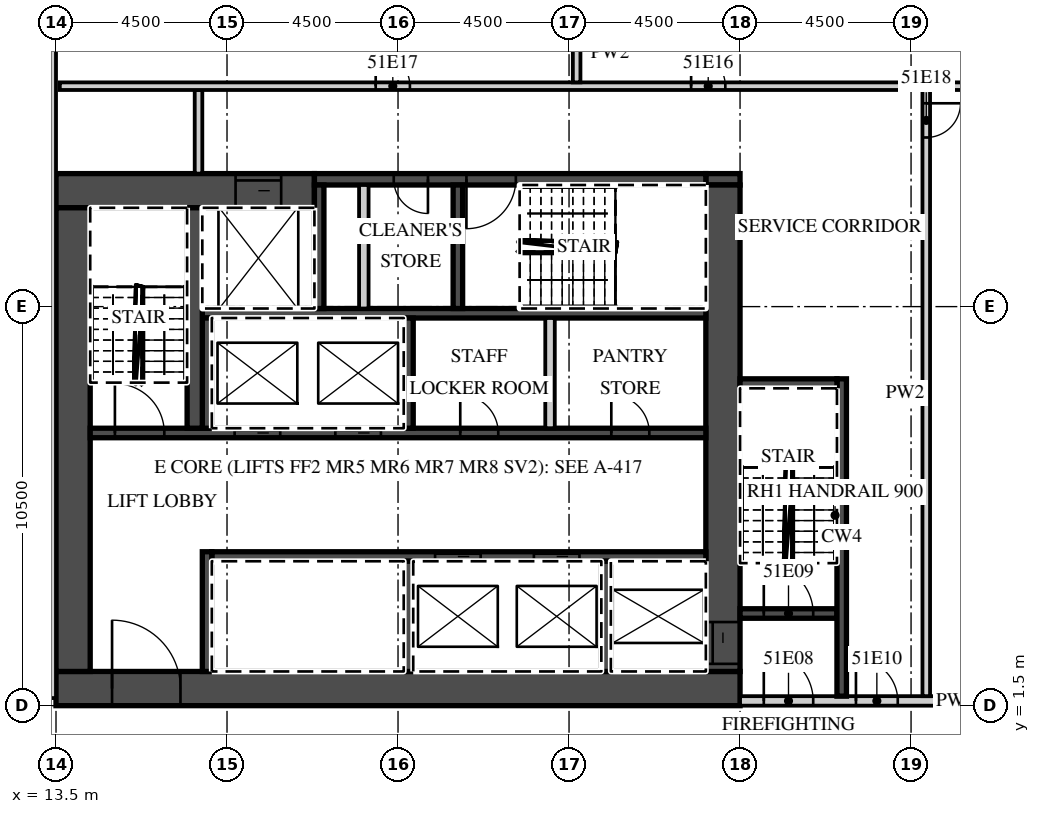
"""IFC4 building model, lengths in metres.
Left out: names, types, materials, properties, quantities, classifications, styles, units other than length and angle.
Written with IfcOpenShell. Run it as: python <this file> out.ifc"""

import sys

from ifc_helpers import new_model, si_unit, direction, frame, frame_2d, origin, place, context, subcontext, project, spatial, rectangle, extrude, element, fill, save


model = new_model("IFC4")
c1 = context("Model", 3, precision=1e-05, world=origin(), true_north=direction((0.0, 1.0)))
c2 = subcontext(c1, "Body", "Model", "MODEL_VIEW")
j1 = project(units=[si_unit("LENGTHUNIT", "METRE"), si_unit("PLANEANGLEUNIT", "RADIAN")], contexts=[c1])
p1 = place(None, origin())
s1 = spatial("IfcSite", under=j1, at=p1, CompositionType="ELEMENT")
p2 = place(p1, origin())
s2 = spatial("IfcBuilding", under=s1, at=p2, CompositionType="ELEMENT")
p3 = place(p2, frame((0.0, 0.0, 211.1)))
s3 = spatial("IfcBuildingStorey", under=s2, at=p3, CompositionType="ELEMENT", Elevation=211.1)
p4 = place(p3, frame((13.5, 1.95, 0.0), z_axis=(0.0, 0.0, 1.0), x_axis=(1.0, 0.0, 0.0)))
e1 = element("IfcWall", 1, at=p4, inside=s3, PredefinedType="SHEAR", context=c2, shape_type="SweptSolid", body=[
    extrude(rectangle(XDim=18.0, YDim=0.9, at=frame_2d((9.0, 0.0))), origin(), (0.0, 0.0, 1.0), 6.32),
])
p5 = place(p4, frame((1.475, 0.0, 0.0)))
e2 = element("IfcOpeningElement", 2, at=p5, cuts=e1, PredefinedType="OPENING", context=c2, shape_type="SweptSolid", body=[
    extrude(rectangle(XDim=1.8, YDim=2.1, at=frame_2d((0.9, 1.05))), frame((0.0, 0.46, 0.0), z_axis=(0.0, -1.0, 0.0), x_axis=(1.0, 0.0, 0.0)), (0.0, 0.0, 1.0), 0.92),
])
p6 = place(p3, frame((13.5, 15.05, 0.0), z_axis=(0.0, 0.0, 1.0), x_axis=(1.0, 0.0, 0.0)))
e3 = element("IfcWall", 3, at=p6, inside=s3, PredefinedType="SHEAR", context=c2, shape_type="SweptSolid", body=[
    extrude(rectangle(XDim=6.8, YDim=0.9, at=frame_2d((3.4, 0.0))), origin(), (0.0, 0.0, 1.0), 6.32),
])
p7 = place(p6, frame((4.725, 0.0, 0.0)))
e4 = element("IfcOpeningElement", 4, at=p7, cuts=e3, PredefinedType="OPENING", context=c2, shape_type="SweptSolid", body=[
    extrude(rectangle(XDim=1.2, YDim=2.1, at=frame_2d((0.6, 1.05))), frame((0.0, 0.46, 0.0), z_axis=(0.0, -1.0, 0.0), x_axis=(1.0, 0.0, 0.0)), (0.0, 0.0, 1.0), 0.92),
])
p8 = place(p3, frame((30.6, 15.35, 0.0), z_axis=(0.0, 0.0, 1.0), x_axis=(1.0, 0.0, 0.0)))
e5 = element("IfcWall", 5, at=p8, inside=s3, PredefinedType="SHEAR", context=c2, shape_type="SweptSolid", body=[
    extrude(rectangle(XDim=0.9, YDim=0.3, at=frame_2d((0.45, 0.0))), origin(), (0.0, 0.0, 1.0), 6.32),
])
p9 = place(p3, frame((20.3, 15.35, 0.0), z_axis=(0.0, 0.0, 1.0), x_axis=(1.0, 0.0, 0.0)))
e6 = element("IfcWall", 6, at=p9, inside=s3, PredefinedType="SHEAR", context=c2, shape_type="SweptSolid", body=[
    extrude(rectangle(XDim=10.3, YDim=0.3, at=frame_2d((5.15, 0.0))), origin(), (0.0, 0.0, 1.0), 6.32),
])
p10 = place(p9, frame((4.0, 0.0, 0.0)))
e7 = element("IfcOpeningElement", 7, at=p10, cuts=e6, PredefinedType="OPENING", context=c2, shape_type="SweptSolid", body=[
    extrude(rectangle(XDim=1.3, YDim=2.1, at=frame_2d((0.65, 1.05))), frame((0.0, 0.16, 0.0), z_axis=(0.0, -1.0, 0.0), x_axis=(1.0, 0.0, 0.0)), (0.0, 0.0, 1.0), 0.32),
])
p11 = place(p9, frame((2.087, 0.0, 0.0)))
e8 = element("IfcOpeningElement", 8, at=p11, cuts=e6, PredefinedType="OPENING", context=c2, shape_type="SweptSolid", body=[
    extrude(rectangle(XDim=0.9, YDim=2.1, at=frame_2d((0.45, 1.05))), frame((0.0, 0.16, 0.0), z_axis=(0.0, -1.0, 0.0), x_axis=(1.0, 0.0, 0.0)), (0.0, 0.0, 1.0), 0.32),
])
p12 = place(p3, frame((31.05, 2.4, 0.0), z_axis=(0.0, 0.0, 1.0), x_axis=(0.0, 1.0, 0.0)))
e9 = element("IfcWall", 9, at=p12, inside=s3, PredefinedType="SHEAR", context=c2, shape_type="SweptSolid", body=[
    extrude(rectangle(XDim=12.8, YDim=0.9, at=frame_2d((6.4, 0.0))), origin(), (0.0, 0.0, 1.0), 6.32),
])
p13 = place(p12, frame((0.2, 0.0, 0.0)))
e10 = element("IfcOpeningElement", 10, at=p13, cuts=e9, PredefinedType="OPENING", context=c2, shape_type="SweptSolid", body=[
    extrude(rectangle(XDim=1.1, YDim=2.1, at=frame_2d((0.55, 1.05))), frame((0.0, 0.46, 0.0), z_axis=(0.0, -1.0, 0.0), x_axis=(1.0, 0.0, 0.0)), (0.0, 0.0, 1.0), 0.92),
])
p14 = place(p3, frame((13.95, 2.4, 0.0), z_axis=(0.0, 0.0, 1.0), x_axis=(0.0, 1.0, 0.0)))
e11 = element("IfcWall", 11, at=p14, inside=s3, PredefinedType="SHEAR", context=c2, shape_type="SweptSolid", body=[
    extrude(rectangle(XDim=12.2, YDim=0.9, at=frame_2d((6.1, 0.0))), origin(), (0.0, 0.0, 1.0), 6.32),
])
p15 = place(p3, frame((17.6, 5.425, 0.0), z_axis=(0.0, 0.0, 1.0), x_axis=(1.0, 0.0, 0.0)))
e12 = element("IfcWall", 12, at=p15, inside=s3, PredefinedType="SHEAR", context=c2, shape_type="SweptSolid", body=[
    extrude(rectangle(XDim=13.0, YDim=0.25, at=frame_2d((6.5, 0.0))), origin(), (0.0, 0.0, 1.0), 6.32),
])
p16 = place(p15, frame((8.475, 0.0, 0.0)))
e13 = element("IfcOpeningElement", 13, at=p16, cuts=e12, PredefinedType="OPENING", context=c2, shape_type="SweptSolid", body=[
    extrude(rectangle(XDim=1.2, YDim=2.1, at=frame_2d((0.6, 1.05))), frame((0.0, 0.135, 0.0), z_axis=(0.0, -1.0, 0.0), x_axis=(1.0, 0.0, 0.0)), (0.0, 0.0, 1.0), 0.27),
])
p17 = place(p15, frame((5.875, 0.0, 0.0)))
e14 = element("IfcOpeningElement", 14, at=p17, cuts=e12, PredefinedType="OPENING", context=c2, shape_type="SweptSolid", body=[
    extrude(rectangle(XDim=1.2, YDim=2.1, at=frame_2d((0.6, 1.05))), frame((0.0, 0.135, 0.0), z_axis=(0.0, -1.0, 0.0), x_axis=(1.0, 0.0, 0.0)), (0.0, 0.0, 1.0), 0.27),
])
p18 = place(p3, frame((17.475, 2.4, 0.0), z_axis=(0.0, 0.0, 1.0), x_axis=(0.0, 1.0, 0.0)))
e15 = element("IfcWall", 15, at=p18, inside=s3, PredefinedType="SHEAR", context=c2, shape_type="SweptSolid", body=[
    extrude(rectangle(XDim=3.15, YDim=0.25, at=frame_2d((1.575, 0.0))), origin(), (0.0, 0.0, 1.0), 6.32),
])
for number, where, z_axis, x_axis in (
    (16, (27.975, 2.4, 0.0), (0.0, 0.0, 1.0), (0.0, 1.0, 0.0)),
    (17, (22.775, 2.4, 0.0), (0.0, 0.0, 1.0), (0.0, 1.0, 0.0)),
):
    element("IfcWall", number, at=place(p3, frame(where, z_axis=z_axis, x_axis=x_axis)), inside=s3, PredefinedType="SHEAR", context=c2, shape_type="SweptSolid", body=[
        extrude(rectangle(XDim=2.9, YDim=0.25, at=frame_2d((1.45, 0.0))), origin(), (0.0, 0.0, 1.0), 6.32),
    ])
p19 = place(p3, frame((14.4, 8.675, 0.0), z_axis=(0.0, 0.0, 1.0), x_axis=(1.0, 0.0, 0.0)))
e18 = element("IfcWall", 18, at=p19, inside=s3, PredefinedType="SHEAR", context=c2, shape_type="SweptSolid", body=[
    extrude(rectangle(XDim=16.2, YDim=0.25, at=frame_2d((8.1, 0.0))), origin(), (0.0, 0.0, 1.0), 6.32),
])
p20 = place(p19, frame((6.45, 0.0, 0.0)))
e19 = element("IfcOpeningElement", 19, at=p20, cuts=e18, PredefinedType="OPENING", context=c2, shape_type="SweptSolid", body=[
    extrude(rectangle(XDim=1.2, YDim=2.1, at=frame_2d((0.6, 1.05))), frame((0.0, 0.135, 0.0), z_axis=(0.0, -1.0, 0.0), x_axis=(1.0, 0.0, 0.0)), (0.0, 0.0, 1.0), 0.27),
])
p21 = place(p19, frame((3.8, 0.0, 0.0)))
e20 = element("IfcOpeningElement", 20, at=p21, cuts=e18, PredefinedType="OPENING", context=c2, shape_type="SweptSolid", body=[
    extrude(rectangle(XDim=1.2, YDim=2.1, at=frame_2d((0.6, 1.05))), frame((0.0, 0.135, 0.0), z_axis=(0.0, -1.0, 0.0), x_axis=(1.0, 0.0, 0.0)), (0.0, 0.0, 1.0), 0.27),
])
p22 = place(p19, frame((0.65, 0.0, 0.0)))
e21 = element("IfcOpeningElement", 21, at=p22, cuts=e18, PredefinedType="OPENING", context=c2, shape_type="SweptSolid", body=[
    extrude(rectangle(XDim=1.3, YDim=2.1, at=frame_2d((0.65, 1.05))), frame((0.0, 0.135, 0.0), z_axis=(0.0, -1.0, 0.0), x_axis=(1.0, 0.0, 0.0)), (0.0, 0.0, 1.0), 0.27),
])
p23 = place(p19, frame((13.712, 0.0, 0.0)))
e22 = element("IfcOpeningElement", 22, at=p23, cuts=e18, PredefinedType="OPENING", context=c2, shape_type="SweptSolid", body=[
    extrude(rectangle(XDim=1.0, YDim=2.1, at=frame_2d((0.5, 1.05))), frame((0.0, 0.135, 0.0), z_axis=(0.0, -1.0, 0.0), x_axis=(1.0, 0.0, 0.0)), (0.0, 0.0, 1.0), 0.27),
])
p24 = place(p19, frame((9.738, 0.0, 0.0)))
e23 = element("IfcOpeningElement", 23, at=p24, cuts=e18, PredefinedType="OPENING", context=c2, shape_type="SweptSolid", body=[
    extrude(rectangle(XDim=1.0, YDim=2.1, at=frame_2d((0.5, 1.05))), frame((0.0, 0.135, 0.0), z_axis=(0.0, -1.0, 0.0), x_axis=(1.0, 0.0, 0.0)), (0.0, 0.0, 1.0), 0.27),
])
p25 = place(p3, frame((17.35, 11.825, 0.0), z_axis=(0.0, 0.0, 1.0), x_axis=(1.0, 0.0, 0.0)))
e24 = element("IfcWall", 24, at=p25, inside=s3, PredefinedType="SHEAR", context=c2, shape_type="SweptSolid", body=[
    extrude(rectangle(XDim=13.25, YDim=0.25, at=frame_2d((6.625, 0.0))), origin(), (0.0, 0.0, 1.0), 6.32),
])
for number, where, z_axis, x_axis in (
    (25, (17.475, 8.8, 0.0), (0.0, 0.0, 1.0), (0.0, 1.0, 0.0)),
    (26, (22.775, 8.8, 0.0), (0.0, 0.0, 1.0), (0.0, 1.0, 0.0)),
):
    element("IfcWall", number, at=place(p3, frame(where, z_axis=z_axis, x_axis=x_axis)), inside=s3, PredefinedType="SHEAR", context=c2, shape_type="SweptSolid", body=[
        extrude(rectangle(XDim=2.9, YDim=0.25, at=frame_2d((1.45, 0.0))), origin(), (0.0, 0.0, 1.0), 6.32),
    ])
p26 = place(p3, frame((26.5, 8.8, 0.0), z_axis=(0.0, 0.0, 1.0), x_axis=(0.0, 1.0, 0.0)))
e27 = element("IfcWall", 27, at=p26, inside=s3, PredefinedType="PARTITIONING", context=c2, shape_type="SweptSolid", body=[
    extrude(rectangle(XDim=2.9, YDim=0.25, at=frame_2d((1.45, 0.0))), origin(), (0.0, 0.0, 1.0), 6.32),
])
p27 = place(p3, frame((17.15, 8.8, 0.0), z_axis=(0.0, 0.0, 1.0), x_axis=(0.0, 1.0, 0.0)))
e28 = element("IfcWall", 28, at=p27, inside=s3, PredefinedType="SHEAR", context=c2, shape_type="SweptSolid", body=[
    extrude(rectangle(XDim=5.8, YDim=0.4, at=frame_2d((2.9, 0.0))), origin(), (0.0, 0.0, 1.0), 6.32),
])
for number, where, z_axis, x_axis in (
    (29, (20.425, 11.95, 0.0), (0.0, 0.0, 1.0), (0.0, 1.0, 0.0)),
    (30, (24.075, 11.95, 0.0), (0.0, 0.0, 1.0), (0.0, 1.0, 0.0)),
):
    element("IfcWall", number, at=place(p3, frame(where, z_axis=z_axis, x_axis=x_axis)), inside=s3, PredefinedType="SHEAR", context=c2, shape_type="SweptSolid", body=[
        extrude(rectangle(XDim=3.25, YDim=0.25, at=frame_2d((1.625, 0.0))), origin(), (0.0, 0.0, 1.0), 6.32),
    ])
p28 = place(p3, frame((21.6, 11.95, 0.0), z_axis=(0.0, 0.0, 1.0), x_axis=(0.0, 1.0, 0.0)))
e31 = element("IfcWall", 31, at=p28, inside=s3, PredefinedType="PARTITIONING", context=c2, shape_type="SweptSolid", body=[
    extrude(rectangle(XDim=3.25, YDim=0.25, at=frame_2d((1.625, 0.0))), origin(), (0.0, 0.0, 1.0), 6.32),
])
p29 = place(p3, frame((31.5, 1.625, 0.0), z_axis=(0.0, 0.0, 1.0), x_axis=(1.0, 0.0, 0.0)))
e32 = element("IfcWall", 32, at=p29, inside=s3, PredefinedType="PARTITIONING", context=c2, shape_type="SweptSolid", body=[
    extrude(rectangle(XDim=11.34, YDim=0.25, at=frame_2d((5.67, 0.0))), origin(), (0.0, 0.0, 1.0), 6.32),
])
p30 = place(p29, frame((0.625, 0.0, 0.0)))
e33 = element("IfcOpeningElement", 33, at=p30, cuts=e32, PredefinedType="OPENING", context=c2, shape_type="SweptSolid", body=[
    extrude(rectangle(XDim=1.3, YDim=2.1, at=frame_2d((0.65, 1.05))), frame((0.0, 0.135, 0.0), z_axis=(0.0, -1.0, 0.0), x_axis=(1.0, 0.0, 0.0)), (0.0, 0.0, 1.0), 0.27),
])
p31 = place(p29, frame((3.05, 0.0, 0.0)))
e34 = element("IfcOpeningElement", 34, at=p31, cuts=e32, PredefinedType="OPENING", context=c2, shape_type="SweptSolid", body=[
    extrude(rectangle(XDim=1.1, YDim=2.1, at=frame_2d((0.55, 1.05))), frame((0.0, 0.135, 0.0), z_axis=(0.0, -1.0, 0.0), x_axis=(1.0, 0.0, 0.0)), (0.0, 0.0, 1.0), 0.27),
])
p32 = place(p3, frame((31.5, 3.925, 0.0), z_axis=(0.0, 0.0, 1.0), x_axis=(1.0, 0.0, 0.0)))
e35 = element("IfcWall", 35, at=p32, inside=s3, PredefinedType="SHEAR", context=c2, shape_type="SweptSolid", body=[
    extrude(rectangle(XDim=2.55, YDim=0.25, at=frame_2d((1.275, 0.0))), origin(), (0.0, 0.0, 1.0), 6.32),
])
p33 = place(p32, frame((0.625, 0.0, 0.0)))
e36 = element("IfcOpeningElement", 36, at=p33, cuts=e35, PredefinedType="OPENING", context=c2, shape_type="SweptSolid", body=[
    extrude(rectangle(XDim=1.3, YDim=2.1, at=frame_2d((0.65, 1.05))), frame((0.0, 0.135, 0.0), z_axis=(0.0, -1.0, 0.0), x_axis=(1.0, 0.0, 0.0)), (0.0, 0.0, 1.0), 0.27),
])
p34 = place(p3, frame((34.175, 1.75, 0.0), z_axis=(0.0, 0.0, 1.0), x_axis=(0.0, 1.0, 0.0)))
e37 = element("IfcWall", 37, at=p34, inside=s3, PredefinedType="SHEAR", context=c2, shape_type="SweptSolid", body=[
    extrude(rectangle(XDim=8.35, YDim=0.25, at=frame_2d((4.175, 0.0))), origin(), (0.0, 0.0, 1.0), 6.32),
])
p35 = place(p3, frame((31.5, 9.975, 0.0), z_axis=(0.0, 0.0, 1.0), x_axis=(1.0, 0.0, 0.0)))
e38 = element("IfcWall", 38, at=p35, inside=s3, PredefinedType="SHEAR", context=c2, shape_type="SweptSolid", body=[
    extrude(rectangle(XDim=2.55, YDim=0.25, at=frame_2d((1.275, 0.0))), origin(), (0.0, 0.0, 1.0), 6.32),
])
p36 = place(p3, frame((17.25, 15.5, 0.0), z_axis=(0.0, 0.0, 1.0), x_axis=(0.0, 1.0, 0.0)))
e39 = element("IfcWall", 39, at=p36, inside=s3, PredefinedType="PARTITIONING", context=c2, shape_type="SweptSolid", body=[
    extrude(rectangle(XDim=2.2, YDim=0.2, at=frame_2d((1.1, 0.0))), origin(), (0.0, 0.0, 1.0), 6.32),
])
p37 = place(p3, frame((36.4, 1.75, 0.0), z_axis=(0.0, 0.0, 1.0), x_axis=(0.0, 1.0, 0.0)))
e40 = element("IfcWall", 40, at=p37, inside=s3, PredefinedType="PARTITIONING", context=c2, shape_type="SweptSolid", body=[
    extrude(rectangle(XDim=15.95, YDim=0.2, at=frame_2d((7.975, 0.0))), origin(), (0.0, 0.0, 1.0), 6.32),
])
p38 = place(p37, frame((14.7, 0.0, 0.0)))
e41 = element("IfcOpeningElement", 41, at=p38, cuts=e40, PredefinedType="OPENING", context=c2, shape_type="SweptSolid", body=[
    extrude(rectangle(XDim=0.9, YDim=2.1, at=frame_2d((0.45, 1.05))), frame((0.0, 0.11, 0.0), z_axis=(0.0, -1.0, 0.0), x_axis=(1.0, 0.0, 0.0)), (0.0, 0.0, 1.0), 0.22),
])
p39 = place(p3, frame((13.6, 17.8, 0.0), z_axis=(0.0, 0.0, 1.0), x_axis=(1.0, 0.0, 0.0)))
e42 = element("IfcWall", 42, at=p39, inside=s3, PredefinedType="PARTITIONING", context=c2, shape_type="SweptSolid", body=[
    extrude(rectangle(XDim=28.958, YDim=0.2, at=frame_2d((14.479, 0.0))), origin(), (0.0, 0.0, 1.0), 6.32),
])
p40 = place(p39, frame((16.613, 0.0, 0.0)))
e43 = element("IfcOpeningElement", 43, at=p40, cuts=e42, PredefinedType="OPENING", context=c2, shape_type="SweptSolid", body=[
    extrude(rectangle(XDim=0.9, YDim=2.1, at=frame_2d((0.45, 1.05))), frame((0.0, 0.11, 0.0), z_axis=(0.0, -1.0, 0.0), x_axis=(1.0, 0.0, 0.0)), (0.0, 0.0, 1.0), 0.22),
])
p41 = place(p39, frame((8.312, 0.0, 0.0)))
e44 = element("IfcOpeningElement", 44, at=p41, cuts=e42, PredefinedType="OPENING", context=c2, shape_type="SweptSolid", body=[
    extrude(rectangle(XDim=0.9, YDim=2.1, at=frame_2d((0.45, 1.05))), frame((0.0, 0.11, 0.0), z_axis=(0.0, -1.0, 0.0), x_axis=(1.0, 0.0, 0.0)), (0.0, 0.0, 1.0), 0.22),
])
p42 = place(p3, frame((27.2, 17.9, 0.0), z_axis=(0.0, 0.0, 1.0), x_axis=(0.0, 1.0, 0.0)))
e45 = element("IfcWall", 45, at=p42, inside=s3, PredefinedType="PARTITIONING", context=c2, shape_type="SweptSolid", body=[
    extrude(rectangle(XDim=3.276, YDim=0.2, at=frame_2d((1.638, 0.0))), origin(), (0.0, 0.0, 1.0), 6.32),
])
p43 = place(p3, frame((13.4, 1.7, 0.0), z_axis=(0.0, 0.0, 1.0), x_axis=(0.0, 1.0, 0.0)))
e46 = element("IfcWall", 46, at=p43, inside=s3, PredefinedType="PARTITIONING", context=c2, shape_type="SweptSolid", body=[
    extrude(rectangle(XDim=19.535, YDim=0.2, at=frame_2d((9.767, 0.0))), origin(), (0.0, 0.0, 1.0), 6.32),
])
p44 = place(p20, origin())
e47 = element("IfcDoor", 47, at=p44, inside=s3, OperationType="SLIDING_TO_LEFT", PredefinedType="DOOR", context=c2, shape_type="SweptSolid", body=[
    extrude(rectangle(XDim=1.2, YDim=2.1, at=frame_2d((0.6, 1.05))), frame((0.0, 0.025, 0.0), z_axis=(0.0, -1.0, 0.0), x_axis=(1.0, 0.0, 0.0)), (0.0, 0.0, 1.0), 0.05),
])
fill(e19, e47)
p45 = place(p21, origin())
e48 = element("IfcDoor", 48, at=p45, inside=s3, OperationType="SLIDING_TO_RIGHT", PredefinedType="DOOR", context=c2, shape_type="SweptSolid", body=[
    extrude(rectangle(XDim=1.2, YDim=2.1, at=frame_2d((0.6, 1.05))), frame((0.0, 0.025, 0.0), z_axis=(0.0, -1.0, 0.0), x_axis=(1.0, 0.0, 0.0)), (0.0, 0.0, 1.0), 0.05),
])
fill(e20, e48)
p46 = place(p16, origin())
e49 = element("IfcDoor", 49, at=p46, inside=s3, OperationType="SLIDING_TO_LEFT", PredefinedType="DOOR", context=c2, shape_type="SweptSolid", body=[
    extrude(rectangle(XDim=1.2, YDim=2.1, at=frame_2d((0.6, 1.05))), frame((0.0, 0.025, 0.0), z_axis=(0.0, -1.0, 0.0), x_axis=(1.0, 0.0, 0.0)), (0.0, 0.0, 1.0), 0.05),
])
fill(e13, e49)
p47 = place(p17, origin())
e50 = element("IfcDoor", 50, at=p47, inside=s3, OperationType="SLIDING_TO_RIGHT", PredefinedType="DOOR", context=c2, shape_type="SweptSolid", body=[
    extrude(rectangle(XDim=1.2, YDim=2.1, at=frame_2d((0.6, 1.05))), frame((0.0, 0.025, 0.0), z_axis=(0.0, -1.0, 0.0), x_axis=(1.0, 0.0, 0.0)), (0.0, 0.0, 1.0), 0.05),
])
fill(e14, e50)
p48 = place(p7, origin())
e51 = element("IfcDoor", 51, at=p48, inside=s3, OperationType="SLIDING_TO_LEFT", PredefinedType="DOOR", context=c2, shape_type="SweptSolid", body=[
    extrude(rectangle(XDim=1.2, YDim=2.1, at=frame_2d((0.6, 1.05))), frame((0.0, 0.025, 0.0), z_axis=(0.0, -1.0, 0.0), x_axis=(1.0, 0.0, 0.0)), (0.0, 0.0, 1.0), 0.05),
])
fill(e4, e51)
p49 = place(p13, origin())
e52 = element("IfcDoor", 52, at=p49, inside=s3, OperationType="SLIDING_TO_LEFT", PredefinedType="DOOR", context=c2, shape_type="SweptSolid", body=[
    extrude(rectangle(XDim=1.1, YDim=2.1, at=frame_2d((0.55, 1.05))), frame((0.0, 0.025, 0.0), z_axis=(0.0, -1.0, 0.0), x_axis=(1.0, 0.0, 0.0)), (0.0, 0.0, 1.0), 0.05),
])
fill(e10, e52)
p50 = place(p5, origin())
e53 = element("IfcDoor", 53, at=p50, inside=s3, OperationType="DOUBLE_DOOR_DOUBLE_SWING", PredefinedType="DOOR", context=c2, shape_type="SweptSolid", body=[
    extrude(rectangle(XDim=1.8, YDim=2.1, at=frame_2d((0.9, 1.05))), frame((0.0, 0.025, 0.0), z_axis=(0.0, -1.0, 0.0), x_axis=(1.0, 0.0, 0.0)), (0.0, 0.0, 1.0), 0.05),
])
fill(e2, e53)
p51 = place(p30, origin())
e54 = element("IfcDoor", 54, at=p51, inside=s3, OperationType="SINGLE_SWING_LEFT", PredefinedType="DOOR", context=c2, shape_type="SweptSolid", body=[
    extrude(rectangle(XDim=1.3, YDim=2.1, at=frame_2d((0.65, 1.05))), frame((0.0, 0.025, 0.0), z_axis=(0.0, -1.0, 0.0), x_axis=(1.0, 0.0, 0.0)), (0.0, 0.0, 1.0), 0.05),
])
fill(e33, e54)
p52 = place(p33, origin())
e55 = element("IfcDoor", 55, at=p52, inside=s3, OperationType="SINGLE_SWING_LEFT", PredefinedType="DOOR", context=c2, shape_type="SweptSolid", body=[
    extrude(rectangle(XDim=1.3, YDim=2.1, at=frame_2d((0.65, 1.05))), frame((0.0, 0.025, 0.0), z_axis=(0.0, -1.0, 0.0), x_axis=(1.0, 0.0, 0.0)), (0.0, 0.0, 1.0), 0.05),
])
fill(e36, e55)
p53 = place(p31, origin())
e56 = element("IfcDoor", 56, at=p53, inside=s3, OperationType="SINGLE_SWING_LEFT", PredefinedType="DOOR", context=c2, shape_type="SweptSolid", body=[
    extrude(rectangle(XDim=1.1, YDim=2.1, at=frame_2d((0.55, 1.05))), frame((0.0, 0.025, 0.0), z_axis=(0.0, -1.0, 0.0), x_axis=(1.0, 0.0, 0.0)), (0.0, 0.0, 1.0), 0.05),
])
fill(e34, e56)
p54 = place(p22, origin())
e57 = element("IfcDoor", 57, at=p54, inside=s3, OperationType="SINGLE_SWING_LEFT", PredefinedType="DOOR", context=c2, shape_type="SweptSolid", body=[
    extrude(rectangle(XDim=1.3, YDim=2.1, at=frame_2d((0.65, 1.05))), frame((0.0, 0.025, 0.0), z_axis=(0.0, -1.0, 0.0), x_axis=(1.0, 0.0, 0.0)), (0.0, 0.0, 1.0), 0.05),
])
fill(e21, e57)
p55 = place(p10, origin())
e58 = element("IfcDoor", 58, at=p55, inside=s3, OperationType="SINGLE_SWING_LEFT", PredefinedType="DOOR", context=c2, shape_type="SweptSolid", body=[
    extrude(rectangle(XDim=1.3, YDim=2.1, at=frame_2d((0.65, 1.05))), frame((0.0, 0.025, 0.0), z_axis=(0.0, -1.0, 0.0), x_axis=(1.0, 0.0, 0.0)), (0.0, 0.0, 1.0), 0.05),
])
fill(e7, e58)
p56 = place(p11, origin())
e59 = element("IfcDoor", 59, at=p56, inside=s3, OperationType="SINGLE_SWING_RIGHT", PredefinedType="DOOR", context=c2, shape_type="SweptSolid", body=[
    extrude(rectangle(XDim=0.9, YDim=2.1, at=frame_2d((0.45, 1.05))), frame((0.0, 0.025, 0.0), z_axis=(0.0, -1.0, 0.0), x_axis=(1.0, 0.0, 0.0)), (0.0, 0.0, 1.0), 0.05),
])
fill(e8, e59)
p57 = place(p23, origin())
e60 = element("IfcDoor", 60, at=p57, inside=s3, OperationType="SINGLE_SWING_LEFT", PredefinedType="DOOR", context=c2, shape_type="SweptSolid", body=[
    extrude(rectangle(XDim=1.0, YDim=2.1, at=frame_2d((0.5, 1.05))), frame((0.0, 0.025, 0.0), z_axis=(0.0, -1.0, 0.0), x_axis=(1.0, 0.0, 0.0)), (0.0, 0.0, 1.0), 0.05),
])
fill(e22, e60)
p58 = place(p24, origin())
e61 = element("IfcDoor", 61, at=p58, inside=s3, OperationType="SINGLE_SWING_LEFT", PredefinedType="DOOR", context=c2, shape_type="SweptSolid", body=[
    extrude(rectangle(XDim=1.0, YDim=2.1, at=frame_2d((0.5, 1.05))), frame((0.0, 0.025, 0.0), z_axis=(0.0, -1.0, 0.0), x_axis=(1.0, 0.0, 0.0)), (0.0, 0.0, 1.0), 0.05),
])
fill(e23, e61)
p59 = place(p40, origin())
e62 = element("IfcDoor", 62, at=p59, inside=s3, OperationType="SINGLE_SWING_LEFT", PredefinedType="DOOR", context=c2, shape_type="SweptSolid", body=[
    extrude(rectangle(XDim=0.9, YDim=2.1, at=frame_2d((0.45, 1.05))), frame((0.0, 0.025, 0.0), z_axis=(0.0, -1.0, 0.0), x_axis=(1.0, 0.0, 0.0)), (0.0, 0.0, 1.0), 0.05),
])
fill(e43, e62)
p60 = place(p41, origin())
e63 = element("IfcDoor", 63, at=p60, inside=s3, OperationType="SINGLE_SWING_LEFT", PredefinedType="DOOR", context=c2, shape_type="SweptSolid", body=[
    extrude(rectangle(XDim=0.9, YDim=2.1, at=frame_2d((0.45, 1.05))), frame((0.0, 0.025, 0.0), z_axis=(0.0, -1.0, 0.0), x_axis=(1.0, 0.0, 0.0)), (0.0, 0.0, 1.0), 0.05),
])
fill(e44, e63)
p61 = place(p38, origin())
e64 = element("IfcDoor", 64, at=p61, inside=s3, OperationType="SINGLE_SWING_RIGHT", PredefinedType="DOOR", context=c2, shape_type="SweptSolid", body=[
    extrude(rectangle(XDim=0.9, YDim=2.1, at=frame_2d((0.45, 1.05))), frame((0.0, 0.025, 0.0), z_axis=(0.0, -1.0, 0.0), x_axis=(1.0, 0.0, 0.0)), (0.0, 0.0, 1.0), 0.05),
])
fill(e41, e64)
save(model, sys.argv[1])
